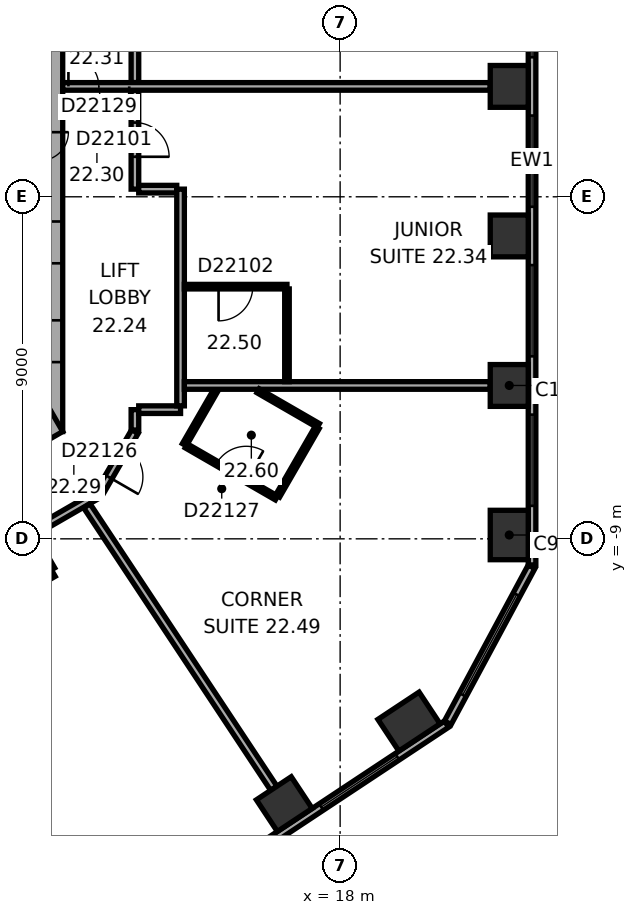
"""IFC4 building model, lengths in metres.
Left out: names, types, materials, properties, quantities, classifications, styles, units other than length and angle.
Written with IfcOpenShell. Run it as: python <this file> out.ifc"""

import sys

from ifc_helpers import new_model, si_unit, direction, frame, frame_2d, origin, origin_2d, place, context, subcontext, project, spatial, rectangle, extrude, element, fill, save


model = new_model("IFC4")
c1 = context("Model", 3, precision=1e-05, world=origin(), true_north=direction((0.0, 1.0)))
c2 = subcontext(c1, "Body", "Model", "MODEL_VIEW")
j1 = project(units=[si_unit("LENGTHUNIT", "METRE"), si_unit("PLANEANGLEUNIT", "RADIAN")], contexts=[c1])
p1 = place(None, origin())
s1 = spatial("IfcSite", under=j1, at=p1, CompositionType="ELEMENT")
p2 = place(p1, origin())
s2 = spatial("IfcBuilding", under=s1, at=p2, CompositionType="ELEMENT")
p3 = place(p2, frame((0.0, 0.0, 96.8)))
s3 = spatial("IfcBuildingStorey", under=s2, at=p3, CompositionType="ELEMENT", Elevation=96.8)
p4 = place(p3, frame((22.45, -8.899, 0.0), z_axis=(0.0, 0.0, 1.0), x_axis=(0.0, 1.0, 0.0)))
e1 = element("IfcColumn", 1, at=p4, inside=s3, PredefinedType="COLUMN", context=c2, shape_type="SweptSolid", body=[
    extrude(rectangle(XDim=1.3, YDim=1.0, at=origin_2d()), origin(), (0.0, 0.0, 1.0), 3.3),
])
for number, where, z_axis, x_axis in (
    (2, (22.45, -4.965, 0.0), (0.0, 0.0, 1.0), (0.0, 1.0, 0.0)),
    (3, (22.45, -1.03, 0.0), (0.0, 0.0, 1.0), (0.0, 1.0, 0.0)),
    (4, (22.45, 2.905, 0.0), (0.0, 0.0, 1.0), (0.0, 1.0, 0.0)),
    (5, (16.531, -15.981, 0.0), (0.0, 0.0, 1.0), (0.834, 0.552, 0.0)),
):
    element("IfcColumn", number, at=place(p3, frame(where, z_axis=z_axis, x_axis=x_axis)), inside=s3, PredefinedType="COLUMN", context=c2, shape_type="SweptSolid", body=[
        extrude(rectangle(XDim=1.1, YDim=1.0, at=origin_2d()), origin(), (0.0, 0.0, 1.0), 3.3),
    ])
p5 = place(p3, frame((19.812, -13.809, 0.0), z_axis=(0.0, 0.0, 1.0), x_axis=(0.833885822067, 0.551936985312, 0.0)))
e6 = element("IfcColumn", 6, at=p5, inside=s3, PredefinedType="COLUMN", context=c2, shape_type="SweptSolid", body=[
    extrude(rectangle(XDim=1.3, YDim=1.0, at=origin_2d()), origin(), (0.0, 0.0, 1.0), 3.3),
])
p6 = place(p3, frame((10.1, -6.177, 0.0), z_axis=(0.0, 0.0, 1.0), x_axis=(0.0, 1.0, 0.0)))
e7 = element("IfcWall", 7, at=p6, inside=s3, PredefinedType="SHEAR", context=c2, shape_type="SweptSolid", body=[
    extrude(rectangle(XDim=12.355, YDim=1.2, at=frame_2d((6.177, 0.0))), origin(), (0.0, 0.0, 1.0), 3.3),
])
p7 = place(p6, frame((6.378, 0.0, 0.0)))
e8 = element("IfcOpeningElement", 8, at=p7, cuts=e7, PredefinedType="OPENING", context=c2, shape_type="SweptSolid", body=[
    extrude(rectangle(XDim=1.5, YDim=2.1, at=frame_2d((0.75, 1.05))), frame((0.0, 0.61, 0.0), z_axis=(0.0, -1.0, 0.0), x_axis=(1.0, 0.0, 0.0)), (0.0, 0.0, 1.0), 1.22),
])
p8 = place(p6, frame((1.828, 0.0, 0.0)))
e9 = element("IfcOpeningElement", 9, at=p8, cuts=e7, PredefinedType="OPENING", context=c2, shape_type="SweptSolid", body=[
    extrude(rectangle(XDim=1.1, YDim=2.1, at=frame_2d((0.55, 1.05))), frame((0.0, 0.61, 0.0), z_axis=(0.0, -1.0, 0.0), x_axis=(1.0, 0.0, 0.0)), (0.0, 0.0, 1.0), 1.22),
])
p9 = place(p6, frame((4.427, 0.0, 0.0)))
e10 = element("IfcOpeningElement", 10, at=p9, cuts=e7, PredefinedType="OPENING", context=c2, shape_type="SweptSolid", body=[
    extrude(rectangle(XDim=1.1, YDim=2.1, at=frame_2d((0.55, 1.05))), frame((0.0, 0.61, 0.0), z_axis=(0.0, -1.0, 0.0), x_axis=(1.0, 0.0, 0.0)), (0.0, 0.0, 1.0), 1.22),
])
p10 = place(p3, frame((-0.3, -11.836, 0.0), z_axis=(0.0, 0.0, 1.0), x_axis=(0.866021384402, 0.500006961711, 0.0)))
e11 = element("IfcWall", 11, at=p10, inside=s3, PredefinedType="SHEAR", context=c2, shape_type="SweptSolid", body=[
    extrude(rectangle(XDim=12.355, YDim=1.2, at=frame_2d((6.178, 0.0))), origin(), (0.0, 0.0, 1.0), 3.3),
])
p11 = place(p10, frame((2.828, 0.0, 0.0)))
e12 = element("IfcOpeningElement", 12, at=p11, cuts=e11, PredefinedType="OPENING", context=c2, shape_type="SweptSolid", body=[
    extrude(rectangle(XDim=0.9, YDim=2.1, at=frame_2d((0.45, 1.05))), frame((0.0, 0.61, 0.0), z_axis=(0.0, -1.0, 0.0), x_axis=(1.0, 0.0, 0.0)), (0.0, 0.0, 1.0), 1.22),
])
p12 = place(p10, frame((5.428, 0.0, 0.0)))
e13 = element("IfcOpeningElement", 13, at=p12, cuts=e11, PredefinedType="OPENING", context=c2, shape_type="SweptSolid", body=[
    extrude(rectangle(XDim=0.9, YDim=2.1, at=frame_2d((0.45, 1.05))), frame((0.0, 0.61, 0.0), z_axis=(0.0, -1.0, 0.0), x_axis=(1.0, 0.0, 0.0)), (0.0, 0.0, 1.0), 1.22),
])
p13 = place(p10, frame((7.928, 0.0, 0.0)))
e14 = element("IfcOpeningElement", 14, at=p13, cuts=e11, PredefinedType="OPENING", context=c2, shape_type="SweptSolid", body=[
    extrude(rectangle(XDim=1.1, YDim=2.1, at=frame_2d((0.55, 1.05))), frame((0.0, 0.61, 0.0), z_axis=(0.0, -1.0, 0.0), x_axis=(1.0, 0.0, 0.0)), (0.0, 0.0, 1.0), 1.22),
])
p14 = place(p3, frame((23.05, -9.687, 0.0), z_axis=(0.0, 0.0, 1.0), x_axis=(0.0, 1.0, 0.0)))
e15 = element("IfcWall", 15, at=p14, inside=s3, PredefinedType="STANDARD", context=c2, shape_type="SweptSolid", body=[
    extrude(rectangle(XDim=21.246, YDim=0.2, at=frame_2d((10.623, 0.0))), origin(), (0.0, 0.0, 1.0), 3.3),
])
p15 = place(p14, frame((1.555, 0.0, 0.8)))
e16 = element("IfcOpeningElement", 16, at=p15, cuts=e15, PredefinedType="OPENING", context=c2, shape_type="SweptSolid", body=[
    extrude(rectangle(XDim=2.4, YDim=1.7, at=frame_2d((1.2, 0.85))), frame((0.0, 0.11, 0.0), z_axis=(0.0, -1.0, 0.0), x_axis=(1.0, 0.0, 0.0)), (0.0, 0.0, 1.0), 0.22),
])
p16 = place(p14, frame((5.489, 0.0, 0.8)))
e17 = element("IfcOpeningElement", 17, at=p16, cuts=e15, PredefinedType="OPENING", context=c2, shape_type="SweptSolid", body=[
    extrude(rectangle(XDim=2.4, YDim=1.7, at=frame_2d((1.2, 0.85))), frame((0.0, 0.11, 0.0), z_axis=(0.0, -1.0, 0.0), x_axis=(1.0, 0.0, 0.0)), (0.0, 0.0, 1.0), 0.22),
])
p17 = place(p14, frame((9.424, 0.0, 0.8)))
e18 = element("IfcOpeningElement", 18, at=p17, cuts=e15, PredefinedType="OPENING", context=c2, shape_type="SweptSolid", body=[
    extrude(rectangle(XDim=2.4, YDim=1.7, at=frame_2d((1.2, 0.85))), frame((0.0, 0.11, 0.0), z_axis=(0.0, -1.0, 0.0), x_axis=(1.0, 0.0, 0.0)), (0.0, 0.0, 1.0), 0.22),
])
p18 = place(p14, frame((13.358, 0.0, 0.8)))
e19 = element("IfcOpeningElement", 19, at=p18, cuts=e15, PredefinedType="OPENING", context=c2, shape_type="SweptSolid", body=[
    extrude(rectangle(XDim=2.4, YDim=1.7, at=frame_2d((1.2, 0.85))), frame((0.0, 0.11, 0.0), z_axis=(0.0, -1.0, 0.0), x_axis=(1.0, 0.0, 0.0)), (0.0, 0.0, 1.0), 0.22),
])
p19 = place(p14, frame((17.293, 0.0, 0.8)))
e20 = element("IfcOpeningElement", 20, at=p19, cuts=e15, PredefinedType="OPENING", context=c2, shape_type="SweptSolid", body=[
    extrude(rectangle(XDim=2.4, YDim=1.7, at=frame_2d((1.2, 0.85))), frame((0.0, 0.11, 0.0), z_axis=(0.0, -1.0, 0.0), x_axis=(1.0, 0.0, 0.0)), (0.0, 0.0, 1.0), 0.22),
])
p20 = place(p3, frame((3.083, -25.601, 0.0), z_axis=(0.0, 0.0, 1.0), x_axis=(0.833884295743, 0.551939291329, 0.0)))
e21 = element("IfcWall", 21, at=p20, inside=s3, PredefinedType="STANDARD", context=c2, shape_type="SweptSolid", body=[
    extrude(rectangle(XDim=21.246, YDim=0.2, at=frame_2d((10.623, 0.0))), origin(), (0.0, 0.0, 1.0), 3.3),
])
p21 = place(p20, frame((1.553, 0.0, 0.8)))
e22 = element("IfcOpeningElement", 22, at=p21, cuts=e21, PredefinedType="OPENING", context=c2, shape_type="SweptSolid", body=[
    extrude(rectangle(XDim=2.4, YDim=1.7, at=frame_2d((1.2, 0.85))), frame((0.0, 0.11, 0.0), z_axis=(0.0, -1.0, 0.0), x_axis=(1.0, 0.0, 0.0)), (0.0, 0.0, 1.0), 0.22),
])
p22 = place(p20, frame((5.488, 0.0, 0.8)))
e23 = element("IfcOpeningElement", 23, at=p22, cuts=e21, PredefinedType="OPENING", context=c2, shape_type="SweptSolid", body=[
    extrude(rectangle(XDim=2.4, YDim=1.7, at=frame_2d((1.2, 0.85))), frame((0.0, 0.11, 0.0), z_axis=(0.0, -1.0, 0.0), x_axis=(1.0, 0.0, 0.0)), (0.0, 0.0, 1.0), 0.22),
])
p23 = place(p20, frame((9.422, 0.0, 0.8)))
e24 = element("IfcOpeningElement", 24, at=p23, cuts=e21, PredefinedType="OPENING", context=c2, shape_type="SweptSolid", body=[
    extrude(rectangle(XDim=2.4, YDim=1.7, at=frame_2d((1.2, 0.85))), frame((0.0, 0.11, 0.0), z_axis=(0.0, -1.0, 0.0), x_axis=(1.0, 0.0, 0.0)), (0.0, 0.0, 1.0), 0.22),
])
p24 = place(p20, frame((13.357, 0.0, 0.8)))
e25 = element("IfcOpeningElement", 25, at=p24, cuts=e21, PredefinedType="OPENING", context=c2, shape_type="SweptSolid", body=[
    extrude(rectangle(XDim=2.4, YDim=1.7, at=frame_2d((1.2, 0.85))), frame((0.0, 0.11, 0.0), z_axis=(0.0, -1.0, 0.0), x_axis=(1.0, 0.0, 0.0)), (0.0, 0.0, 1.0), 0.22),
])
p25 = place(p20, frame((17.291, 0.0, 0.8)))
e26 = element("IfcOpeningElement", 26, at=p25, cuts=e21, PredefinedType="OPENING", context=c2, shape_type="SweptSolid", body=[
    extrude(rectangle(XDim=2.4, YDim=1.7, at=frame_2d((1.2, 0.85))), frame((0.0, 0.11, 0.0), z_axis=(0.0, -1.0, 0.0), x_axis=(1.0, 0.0, 0.0)), (0.0, 0.0, 1.0), 0.22),
])
p26 = place(p3, frame((20.833, -13.839, 0.0), z_axis=(0.0, 0.0, 1.0), x_axis=(0.473321668581, 0.880889662813, 0.0)))
e27 = element("IfcWall", 27, at=p26, inside=s3, PredefinedType="STANDARD", context=c2, shape_type="SweptSolid", body=[
    extrude(rectangle(XDim=4.66, YDim=0.2, at=frame_2d((2.33, 0.0))), origin(), (0.0, 0.0, 1.0), 3.3),
])
p27 = place(p26, frame((0.83, 0.0, 0.8)))
e28 = element("IfcOpeningElement", 28, at=p27, cuts=e27, PredefinedType="OPENING", context=c2, shape_type="SweptSolid", body=[
    extrude(rectangle(XDim=3.0, YDim=1.7, at=frame_2d((1.5, 0.85))), frame((0.0, 0.11, 0.0), z_axis=(0.0, -1.0, 0.0), x_axis=(1.0, 0.0, 0.0)), (0.0, 0.0, 1.0), 0.22),
])
p28 = place(p3, frame((7.419, -11.653, 0.0), z_axis=(0.0, 0.0, 1.0), x_axis=(0.866038154057, 0.49997791523, 0.0)))
e29 = element("IfcWall", 29, at=p28, inside=s3, PredefinedType="PARTITIONING", context=c2, shape_type="SweptSolid", body=[
    extrude(rectangle(XDim=3.502, YDim=0.2, at=frame_2d((1.751, 0.0))), origin(), (0.0, 0.0, 1.0), 3.05),
])
p29 = place(p3, frame((9.852, -8.861, 0.0), z_axis=(0.0, 0.0, 1.0), x_axis=(0.866013291437, 0.500020978615, 0.0)))
e30 = element("IfcWall", 30, at=p29, inside=s3, PredefinedType="PARTITIONING", context=c2, shape_type="SweptSolid", body=[
    extrude(rectangle(XDim=2.077, YDim=0.2, at=frame_2d((1.038, 0.0))), origin(), (0.0, 0.0, 1.0), 3.05),
])
p30 = place(p3, frame((10.402, -9.815, 0.0), z_axis=(0.0, 0.0, 1.0), x_axis=(-0.499968756647, 0.866043441391, 0.0)))
e31 = element("IfcWall", 31, at=p30, inside=s3, PredefinedType="PARTITIONING", context=c2, shape_type="SweptSolid", body=[
    extrude(rectangle(XDim=1.001, YDim=0.2, at=frame_2d((0.5, 0.0))), origin(), (0.0, 0.0, 1.0), 3.05),
])
p31 = place(p3, frame((11.67, -7.788, 0.0), z_axis=(0.0, 0.0, 1.0), x_axis=(0.500063286585, 0.865988862174, 0.0)))
e32 = element("IfcWall", 32, at=p31, inside=s3, PredefinedType="PARTITIONING", context=c2, shape_type="SweptSolid", body=[
    extrude(rectangle(XDim=1.86, YDim=0.2, at=frame_2d((0.93, 0.0))), origin(), (0.0, 0.0, 1.0), 3.05),
])
p32 = place(p31, frame((0.48, 0.0, 0.0)))
e33 = element("IfcOpeningElement", 33, at=p32, cuts=e32, PredefinedType="OPENING", context=c2, shape_type="SweptSolid", body=[
    extrude(rectangle(XDim=0.9, YDim=2.1, at=frame_2d((0.45, 1.05))), frame((0.0, 0.11, 0.0), z_axis=(0.0, -1.0, 0.0), x_axis=(1.0, 0.0, 0.0)), (0.0, 0.0, 1.0), 0.22),
])
p33 = place(p3, frame((12.6, -6.138, 0.0), z_axis=(0.0, 0.0, 1.0), x_axis=(0.0, 1.0, 0.0)))
e34 = element("IfcWall", 34, at=p33, inside=s3, PredefinedType="PARTITIONING", context=c2, shape_type="SweptSolid", body=[
    extrude(rectangle(XDim=0.537, YDim=0.2, at=frame_2d((0.268, 0.0))), origin(), (0.0, 0.0, 1.0), 3.05),
])
p34 = place(p3, frame((12.6, 0.201, 0.0), z_axis=(0.0, 0.0, 1.0), x_axis=(0.0, 1.0, 0.0)))
e35 = element("IfcWall", 35, at=p34, inside=s3, PredefinedType="PARTITIONING", context=c2, shape_type="SweptSolid", body=[
    extrude(rectangle(XDim=2.604, YDim=0.2, at=frame_2d((1.302, 0.0))), origin(), (0.0, 0.0, 1.0), 3.05),
])
p35 = place(p34, frame((0.852, 0.0, 0.0)))
e36 = element("IfcOpeningElement", 36, at=p35, cuts=e35, PredefinedType="OPENING", context=c2, shape_type="SweptSolid", body=[
    extrude(rectangle(XDim=0.9, YDim=2.1, at=frame_2d((0.45, 1.05))), frame((0.0, 0.11, 0.0), z_axis=(0.0, -1.0, 0.0), x_axis=(1.0, 0.0, 0.0)), (0.0, 0.0, 1.0), 0.22),
])
p36 = place(p3, frame((12.6, 3.004, 0.0), z_axis=(0.0, 0.0, 1.0), x_axis=(0.0, 1.0, 0.0)))
e37 = element("IfcWall", 37, at=p36, inside=s3, PredefinedType="PARTITIONING", context=c2, shape_type="SweptSolid", body=[
    extrude(rectangle(XDim=3.173, YDim=0.2, at=frame_2d((1.586, 0.0))), origin(), (0.0, 0.0, 1.0), 3.05),
])
p37 = place(p36, frame((1.136, 0.0, 0.0)))
e38 = element("IfcOpeningElement", 38, at=p37, cuts=e37, PredefinedType="OPENING", context=c2, shape_type="SweptSolid", body=[
    extrude(rectangle(XDim=0.9, YDim=2.1, at=frame_2d((0.45, 1.05))), frame((0.0, 0.11, 0.0), z_axis=(0.0, -1.0, 0.0), x_axis=(1.0, 0.0, 0.0)), (0.0, 0.0, 1.0), 0.22),
])
p38 = place(p3, frame((12.7, -5.601, 0.0), z_axis=(0.0, 0.0, 1.0), x_axis=(1.0, 0.0, 0.0)))
e39 = element("IfcWall", 39, at=p38, inside=s3, PredefinedType="PARTITIONING", context=c2, shape_type="SweptSolid", body=[
    extrude(rectangle(XDim=1.101, YDim=0.2, at=frame_2d((0.551, 0.0))), origin(), (0.0, 0.0, 1.0), 3.05),
])
p39 = place(p3, frame((13.701, 0.201, 0.0), z_axis=(0.0, 0.0, 1.0), x_axis=(-1.0, 0.0, 0.0)))
e40 = element("IfcWall", 40, at=p39, inside=s3, PredefinedType="PARTITIONING", context=c2, shape_type="SweptSolid", body=[
    extrude(rectangle(XDim=1.001, YDim=0.2, at=frame_2d((0.5, 0.0))), origin(), (0.0, 0.0, 1.0), 3.05),
])
p40 = place(p3, frame((13.801, -5.501, 0.0), z_axis=(0.0, 0.0, 1.0), x_axis=(0.0, 1.0, 0.0)))
e41 = element("IfcWall", 41, at=p40, inside=s3, PredefinedType="PARTITIONING", context=c2, shape_type="SweptSolid", body=[
    extrude(rectangle(XDim=5.702, YDim=0.2, at=frame_2d((2.851, 0.0))), origin(), (0.0, 0.0, 1.0), 3.05),
])
p41 = place(p3, frame((13.901, -6.524, 0.0), z_axis=(0.0, 0.0, 1.0), x_axis=(0.499964162598, 0.86604609353, 0.0)))
e42 = element("IfcWall", 42, at=p41, inside=s3, PredefinedType="PARTITIONING", context=c2, shape_type="SweptSolid", body=[
    extrude(rectangle(XDim=1.661, YDim=0.12, at=frame_2d((0.831, 0.0))), origin(), (0.0, 0.0, 1.0), 3.05),
])
p42 = place(p3, frame((13.901, -4.965, 0.0), z_axis=(0.0, 0.0, 1.0), x_axis=(1.0, 0.0, 0.0)))
e43 = element("IfcWall", 43, at=p42, inside=s3, PredefinedType="PARTITIONING", context=c2, shape_type="SweptSolid", body=[
    extrude(rectangle(XDim=8.049, YDim=0.2, at=frame_2d((4.024, 0.0))), origin(), (0.0, 0.0, 1.0), 3.05),
])
p43 = place(p3, frame((13.901, -2.365, 0.0), z_axis=(0.0, 0.0, 1.0), x_axis=(1.0, 0.0, 0.0)))
e44 = element("IfcWall", 44, at=p43, inside=s3, PredefinedType="PARTITIONING", context=c2, shape_type="SweptSolid", body=[
    extrude(rectangle(XDim=2.7, YDim=0.12, at=frame_2d((1.35, 0.0))), origin(), (0.0, 0.0, 1.0), 3.05),
])
p44 = place(p43, frame((0.9, 0.0, 0.0)))
e45 = element("IfcOpeningElement", 45, at=p44, cuts=e44, PredefinedType="OPENING", context=c2, shape_type="SweptSolid", body=[
    extrude(rectangle(XDim=0.9, YDim=2.1, at=frame_2d((0.45, 1.05))), frame((0.0, 0.07, 0.0), z_axis=(0.0, -1.0, 0.0), x_axis=(1.0, 0.0, 0.0)), (0.0, 0.0, 1.0), 0.14),
])
p45 = place(p3, frame((15.841, -5.104, 0.0), z_axis=(0.0, 0.0, 1.0), x_axis=(0.866025591402, -0.499999675036, 0.0)))
e46 = element("IfcWall", 46, at=p45, inside=s3, PredefinedType="PARTITIONING", context=c2, shape_type="SweptSolid", body=[
    extrude(rectangle(XDim=1.83, YDim=0.12, at=frame_2d((0.915, 0.0))), origin(), (0.0, 0.0, 1.0), 3.05),
])
p46 = place(p3, frame((16.255, -15.564, 0.0), z_axis=(0.0, 0.0, 1.0), x_axis=(-0.55192208744, 0.833895682562, 0.0)))
e47 = element("IfcWall", 47, at=p46, inside=s3, PredefinedType="PARTITIONING", context=c2, shape_type="SweptSolid", body=[
    extrude(rectangle(XDim=8.913, YDim=0.2, at=frame_2d((4.457, 0.0))), origin(), (0.0, 0.0, 1.0), 2.6),
])
p47 = place(p3, frame((16.326, -7.925, 0.0), z_axis=(0.0, 0.0, 1.0), x_axis=(-0.865997131366, 0.500048966069, 0.0)))
e48 = element("IfcWall", 48, at=p47, inside=s3, PredefinedType="PARTITIONING", context=c2, shape_type="SweptSolid", body=[
    extrude(rectangle(XDim=2.74, YDim=0.12, at=frame_2d((1.37, 0.0))), origin(), (0.0, 0.0, 1.0), 3.05),
])
p48 = place(p47, frame((0.92, 0.0, 0.0)))
e49 = element("IfcOpeningElement", 49, at=p48, cuts=e48, PredefinedType="OPENING", context=c2, shape_type="SweptSolid", body=[
    extrude(rectangle(XDim=0.9, YDim=2.1, at=frame_2d((0.45, 1.05))), frame((0.0, 0.07, 0.0), z_axis=(0.0, -1.0, 0.0), x_axis=(1.0, 0.0, 0.0)), (0.0, 0.0, 1.0), 0.14),
])
p49 = place(p3, frame((16.601, -2.425, 0.0), z_axis=(0.0, 0.0, 1.0), x_axis=(0.0, -1.0, 0.0)))
e50 = element("IfcWall", 50, at=p49, inside=s3, PredefinedType="PARTITIONING", context=c2, shape_type="SweptSolid", body=[
    extrude(rectangle(XDim=2.44, YDim=0.12, at=frame_2d((1.22, 0.0))), origin(), (0.0, 0.0, 1.0), 3.05),
])
p50 = place(p3, frame((17.396, -6.071, 0.0), z_axis=(0.0, 0.0, 1.0), x_axis=(-0.500027264788, -0.866009661879, 0.0)))
e51 = element("IfcWall", 51, at=p50, inside=s3, PredefinedType="PARTITIONING", context=c2, shape_type="SweptSolid", body=[
    extrude(rectangle(XDim=2.08, YDim=0.12, at=frame_2d((1.04, 0.0))), origin(), (0.0, 0.0, 1.0), 3.05),
])
p51 = place(p3, frame((21.95, 2.905, 0.0), z_axis=(0.0, 0.0, 1.0), x_axis=(-1.0, 0.0, 0.0)))
e52 = element("IfcWall", 52, at=p51, inside=s3, PredefinedType="PARTITIONING", context=c2, shape_type="SweptSolid", body=[
    extrude(rectangle(XDim=11.25, YDim=0.2, at=frame_2d((5.625, 0.0))), origin(), (0.0, 0.0, 1.0), 3.05),
])
p52 = place(p51, frame((9.5, 0.0, 0.0)))
e53 = element("IfcOpeningElement", 53, at=p52, cuts=e52, PredefinedType="OPENING", context=c2, shape_type="SweptSolid", body=[
    extrude(rectangle(XDim=1.6, YDim=2.1, at=frame_2d((0.8, 1.05))), frame((0.0, 0.11, 0.0), z_axis=(0.0, -1.0, 0.0), x_axis=(1.0, 0.0, 0.0)), (0.0, 0.0, 1.0), 0.22),
])
p53 = place(p15, origin())
e54 = element("IfcWindow", 54, at=p53, inside=s3, PartitioningType="SINGLE_PANEL", PredefinedType="WINDOW", context=c2, shape_type="SweptSolid", body=[
    extrude(rectangle(XDim=2.4, YDim=1.7, at=frame_2d((1.2, 0.85))), frame((0.0, 0.03, 0.0), z_axis=(0.0, -1.0, 0.0), x_axis=(1.0, 0.0, 0.0)), (0.0, 0.0, 1.0), 0.06),
])
fill(e16, e54)
p54 = place(p16, origin())
e55 = element("IfcWindow", 55, at=p54, inside=s3, PartitioningType="SINGLE_PANEL", PredefinedType="WINDOW", context=c2, shape_type="SweptSolid", body=[
    extrude(rectangle(XDim=2.4, YDim=1.7, at=frame_2d((1.2, 0.85))), frame((0.0, 0.03, 0.0), z_axis=(0.0, -1.0, 0.0), x_axis=(1.0, 0.0, 0.0)), (0.0, 0.0, 1.0), 0.06),
])
fill(e17, e55)
p55 = place(p17, origin())
e56 = element("IfcWindow", 56, at=p55, inside=s3, PartitioningType="SINGLE_PANEL", PredefinedType="WINDOW", context=c2, shape_type="SweptSolid", body=[
    extrude(rectangle(XDim=2.4, YDim=1.7, at=frame_2d((1.2, 0.85))), frame((0.0, 0.03, 0.0), z_axis=(0.0, -1.0, 0.0), x_axis=(1.0, 0.0, 0.0)), (0.0, 0.0, 1.0), 0.06),
])
fill(e18, e56)
p56 = place(p18, origin())
e57 = element("IfcWindow", 57, at=p56, inside=s3, PartitioningType="SINGLE_PANEL", PredefinedType="WINDOW", context=c2, shape_type="SweptSolid", body=[
    extrude(rectangle(XDim=2.4, YDim=1.7, at=frame_2d((1.2, 0.85))), frame((0.0, 0.03, 0.0), z_axis=(0.0, -1.0, 0.0), x_axis=(1.0, 0.0, 0.0)), (0.0, 0.0, 1.0), 0.06),
])
fill(e19, e57)
p57 = place(p25, origin())
e58 = element("IfcWindow", 58, at=p57, inside=s3, PartitioningType="SINGLE_PANEL", PredefinedType="WINDOW", context=c2, shape_type="SweptSolid", body=[
    extrude(rectangle(XDim=2.4, YDim=1.7, at=frame_2d((1.2, 0.85))), frame((0.0, 0.03, 0.0), z_axis=(0.0, -1.0, 0.0), x_axis=(1.0, 0.0, 0.0)), (0.0, 0.0, 1.0), 0.06),
])
fill(e26, e58)
p58 = place(p27, origin())
e59 = element("IfcWindow", 59, at=p58, inside=s3, PartitioningType="SINGLE_PANEL", PredefinedType="WINDOW", context=c2, shape_type="SweptSolid", body=[
    extrude(rectangle(XDim=3.0, YDim=1.7, at=frame_2d((1.5, 0.85))), frame((0.0, 0.03, 0.0), z_axis=(0.0, -1.0, 0.0), x_axis=(1.0, 0.0, 0.0)), (0.0, 0.0, 1.0), 0.06),
])
fill(e28, e59)
p59 = place(p35, origin())
e60 = element("IfcDoor", 60, at=p59, inside=s3, OperationType="SINGLE_SWING_LEFT", PredefinedType="DOOR", context=c2, shape_type="SweptSolid", body=[
    extrude(rectangle(XDim=0.9, YDim=2.1, at=frame_2d((0.45, 1.05))), frame((0.0, 0.025, 0.0), z_axis=(0.0, -1.0, 0.0), x_axis=(1.0, 0.0, 0.0)), (0.0, 0.0, 1.0), 0.05),
])
fill(e36, e60)
p60 = place(p44, origin())
e61 = element("IfcDoor", 61, at=p60, inside=s3, OperationType="SINGLE_SWING_LEFT", PredefinedType="DOOR", context=c2, shape_type="SweptSolid", body=[
    extrude(rectangle(XDim=0.9, YDim=2.1, at=frame_2d((0.45, 1.05))), frame((0.0, 0.025, 0.0), z_axis=(0.0, -1.0, 0.0), x_axis=(1.0, 0.0, 0.0)), (0.0, 0.0, 1.0), 0.05),
])
fill(e45, e61)
p61 = place(p32, origin())
e62 = element("IfcDoor", 62, at=p61, inside=s3, OperationType="SINGLE_SWING_LEFT", PredefinedType="DOOR", context=c2, shape_type="SweptSolid", body=[
    extrude(rectangle(XDim=0.9, YDim=2.1, at=frame_2d((0.45, 1.05))), frame((0.0, 0.025, 0.0), z_axis=(0.0, -1.0, 0.0), x_axis=(1.0, 0.0, 0.0)), (0.0, 0.0, 1.0), 0.05),
])
fill(e33, e62)
p62 = place(p48, origin())
e63 = element("IfcDoor", 63, at=p62, inside=s3, OperationType="SINGLE_SWING_LEFT", PredefinedType="DOOR", context=c2, shape_type="SweptSolid", body=[
    extrude(rectangle(XDim=0.9, YDim=2.1, at=frame_2d((0.45, 1.05))), frame((0.0, 0.025, 0.0), z_axis=(0.0, -1.0, 0.0), x_axis=(1.0, 0.0, 0.0)), (0.0, 0.0, 1.0), 0.05),
])
fill(e49, e63)
p63 = place(p52, origin())
e64 = element("IfcDoor", 64, at=p63, inside=s3, OperationType="DOUBLE_DOOR_SINGLE_SWING", PredefinedType="DOOR", context=c2, shape_type="SweptSolid", body=[
    extrude(rectangle(XDim=1.6, YDim=2.1, at=frame_2d((0.8, 1.05))), frame((0.0, 0.025, 0.0), z_axis=(0.0, -1.0, 0.0), x_axis=(1.0, 0.0, 0.0)), (0.0, 0.0, 1.0), 0.05),
])
fill(e53, e64)
save(model, sys.argv[1])
